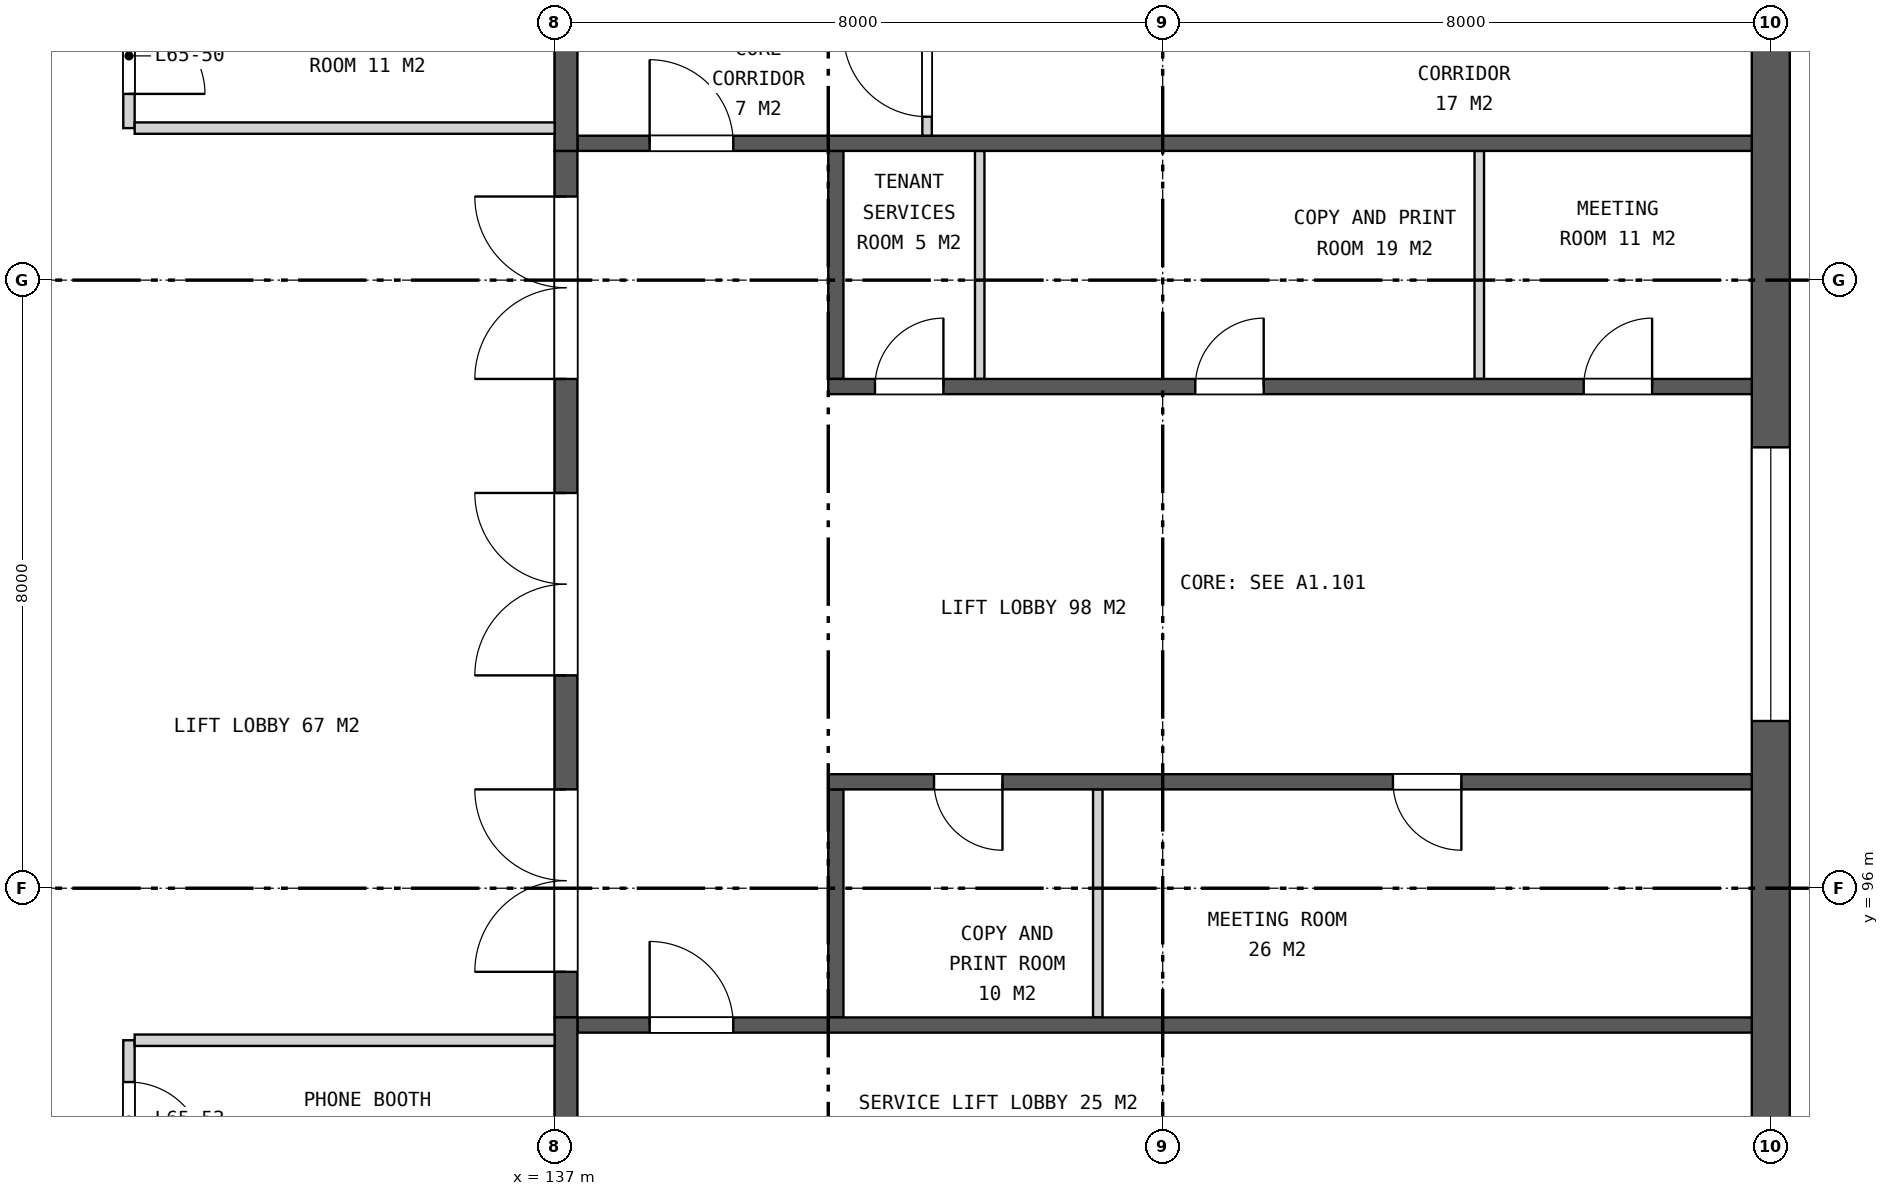
"""IFC4 building model, lengths in metres.
Left out: names, types, materials, properties, quantities, classifications, styles, units other than length and angle.
Written with IfcOpenShell. Run it as: python <this file> out.ifc"""

import sys

from ifc_helpers import new_model, si_unit, direction, frame, frame_2d, origin, place, context, subcontext, project, spatial, rectangle, extrude, element, fill, save


model = new_model("IFC4")
c1 = context("Model", 3, precision=1e-05, world=origin(), true_north=direction((0.0, 1.0)))
c2 = subcontext(c1, "Body", "Model", "MODEL_VIEW")
j1 = project(units=[si_unit("LENGTHUNIT", "METRE"), si_unit("PLANEANGLEUNIT", "RADIAN")], contexts=[c1])
p1 = place(None, origin())
s1 = spatial("IfcSite", under=j1, at=p1, CompositionType="ELEMENT")
p2 = place(p1, origin())
s2 = spatial("IfcBuilding", under=s1, at=p2, CompositionType="ELEMENT")
p3 = place(p2, frame((0.0, 0.0, 299.7)))
s3 = spatial("IfcBuildingStorey", under=s2, at=p3, CompositionType="ELEMENT", Elevation=299.7)
p4 = place(p3, frame((153.0, 88.25, 0.0), z_axis=(0.0, 0.0, 1.0), x_axis=(0.0, 1.0, 0.0)))
e1 = element("IfcWall", 1, at=p4, inside=s3, PredefinedType="SHEAR", context=c2, shape_type="SweptSolid", body=[
    extrude(rectangle(XDim=23.5, YDim=0.5, at=frame_2d((11.75, 0.0))), origin(), (0.0, 0.0, 1.0), 4.2),
])
p5 = place(p4, frame((9.95, 0.0, 0.15)))
e2 = element("IfcOpeningElement", 2, at=p5, cuts=e1, PredefinedType="OPENING", context=c2, shape_type="SweptSolid", body=[
    extrude(rectangle(XDim=3.6, YDim=3.0, at=frame_2d((1.8, 1.5))), frame((0.0, 0.26, 0.0), z_axis=(0.0, -1.0, 0.0), x_axis=(1.0, 0.0, 0.0)), (0.0, 0.0, 1.0), 0.52),
])
p6 = place(p3, frame((137.15, 94.3, 0.0), z_axis=(0.0, 0.0, 1.0), x_axis=(0.0, 1.0, 0.0)))
e3 = element("IfcWall", 3, at=p6, inside=s3, PredefinedType="SHEAR", context=c2, shape_type="SweptSolid", body=[
    extrude(rectangle(XDim=11.4, YDim=0.3, at=frame_2d((5.7, 0.0))), origin(), (0.0, 0.0, 1.0), 4.2),
])
p7 = place(p6, frame((0.6, 0.0, 0.0)))
e4 = element("IfcOpeningElement", 4, at=p7, cuts=e3, PredefinedType="OPENING", context=c2, shape_type="SweptSolid", body=[
    extrude(rectangle(XDim=2.4, YDim=2.4, at=frame_2d((1.2, 1.2))), frame((0.0, 0.16, 0.0), z_axis=(0.0, -1.0, 0.0), x_axis=(1.0, 0.0, 0.0)), (0.0, 0.0, 1.0), 0.32),
])
p8 = place(p6, frame((4.5, 0.0, 0.0)))
e5 = element("IfcOpeningElement", 5, at=p8, cuts=e3, PredefinedType="OPENING", context=c2, shape_type="SweptSolid", body=[
    extrude(rectangle(XDim=2.4, YDim=2.4, at=frame_2d((1.2, 1.2))), frame((0.0, 0.16, 0.0), z_axis=(0.0, -1.0, 0.0), x_axis=(1.0, 0.0, 0.0)), (0.0, 0.0, 1.0), 0.32),
])
p9 = place(p6, frame((8.4, 0.0, 0.0)))
e6 = element("IfcOpeningElement", 6, at=p9, cuts=e3, PredefinedType="OPENING", context=c2, shape_type="SweptSolid", body=[
    extrude(rectangle(XDim=2.4, YDim=2.4, at=frame_2d((1.2, 1.2))), frame((0.0, 0.16, 0.0), z_axis=(0.0, -1.0, 0.0), x_axis=(1.0, 0.0, 0.0)), (0.0, 0.0, 1.0), 0.32),
])
p10 = place(p3, frame((140.7, 102.7, 0.0), z_axis=(0.0, 0.0, 1.0), x_axis=(0.0, 1.0, 0.0)))
e7 = element("IfcWall", 7, at=p10, inside=s3, PredefinedType="SHEAR", context=c2, shape_type="SweptSolid", body=[
    extrude(rectangle(XDim=3.0, YDim=0.2, at=frame_2d((1.5, 0.0))), origin(), (0.0, 0.0, 1.0), 4.2),
])
for number, where, z_axis, x_axis in (
    (8, (142.593, 102.7, 0.0), (0.0, 0.0, 1.0), (0.0, 1.0, 0.0)),
    (9, (149.165, 102.7, 0.0), (0.0, 0.0, 1.0), (0.0, 1.0, 0.0)),
):
    element("IfcWall", number, at=place(p3, frame(where, z_axis=z_axis, x_axis=x_axis)), inside=s3, PredefinedType="PARTITIONING", context=c2, shape_type="SweptSolid", body=[
        extrude(rectangle(XDim=3.0, YDim=0.125, at=frame_2d((1.5, 0.0))), origin(), (0.0, 0.0, 1.0), 4.2),
    ])
p11 = place(p3, frame((140.6, 102.6, 0.0), z_axis=(0.0, 0.0, 1.0), x_axis=(1.0, 0.0, 0.0)))
e10 = element("IfcWall", 10, at=p11, inside=s3, PredefinedType="SHEAR", context=c2, shape_type="SweptSolid", body=[
    extrude(rectangle(XDim=12.15, YDim=0.2, at=frame_2d((6.075, 0.0))), origin(), (0.0, 0.0, 1.0), 4.2),
])
p12 = place(p11, frame((0.615, 0.0, 0.0)))
e11 = element("IfcOpeningElement", 11, at=p12, cuts=e10, PredefinedType="OPENING", context=c2, shape_type="SweptSolid", body=[
    extrude(rectangle(XDim=0.9, YDim=2.1, at=frame_2d((0.45, 1.05))), frame((0.0, 0.11, 0.0), z_axis=(0.0, -1.0, 0.0), x_axis=(1.0, 0.0, 0.0)), (0.0, 0.0, 1.0), 0.22),
])
p13 = place(p11, frame((4.829, 0.0, 0.0)))
e12 = element("IfcOpeningElement", 12, at=p13, cuts=e10, PredefinedType="OPENING", context=c2, shape_type="SweptSolid", body=[
    extrude(rectangle(XDim=0.9, YDim=2.1, at=frame_2d((0.45, 1.05))), frame((0.0, 0.11, 0.0), z_axis=(0.0, -1.0, 0.0), x_axis=(1.0, 0.0, 0.0)), (0.0, 0.0, 1.0), 0.22),
])
p14 = place(p11, frame((9.939, 0.0, 0.0)))
e13 = element("IfcOpeningElement", 13, at=p14, cuts=e10, PredefinedType="OPENING", context=c2, shape_type="SweptSolid", body=[
    extrude(rectangle(XDim=0.9, YDim=2.1, at=frame_2d((0.45, 1.05))), frame((0.0, 0.11, 0.0), z_axis=(0.0, -1.0, 0.0), x_axis=(1.0, 0.0, 0.0)), (0.0, 0.0, 1.0), 0.22),
])
p15 = place(p3, frame((140.7, 94.3, 0.0), z_axis=(0.0, 0.0, 1.0), x_axis=(0.0, 1.0, 0.0)))
e14 = element("IfcWall", 14, at=p15, inside=s3, PredefinedType="SHEAR", context=c2, shape_type="SweptSolid", body=[
    extrude(rectangle(XDim=3.0, YDim=0.2, at=frame_2d((1.5, 0.0))), origin(), (0.0, 0.0, 1.0), 4.2),
])
p16 = place(p3, frame((144.146, 94.3, 0.0), z_axis=(0.0, 0.0, 1.0), x_axis=(0.0, 1.0, 0.0)))
e15 = element("IfcWall", 15, at=p16, inside=s3, PredefinedType="PARTITIONING", context=c2, shape_type="SweptSolid", body=[
    extrude(rectangle(XDim=3.0, YDim=0.125, at=frame_2d((1.5, 0.0))), origin(), (0.0, 0.0, 1.0), 4.2),
])
p17 = place(p3, frame((140.6, 97.4, 0.0), z_axis=(0.0, 0.0, 1.0), x_axis=(1.0, 0.0, 0.0)))
e16 = element("IfcWall", 16, at=p17, inside=s3, PredefinedType="SHEAR", context=c2, shape_type="SweptSolid", body=[
    extrude(rectangle(XDim=12.15, YDim=0.2, at=frame_2d((6.075, 0.0))), origin(), (0.0, 0.0, 1.0), 4.2),
])
p18 = place(p17, frame((1.392, 0.0, 0.0)))
e17 = element("IfcOpeningElement", 17, at=p18, cuts=e16, PredefinedType="OPENING", context=c2, shape_type="SweptSolid", body=[
    extrude(rectangle(XDim=0.9, YDim=2.1, at=frame_2d((0.45, 1.05))), frame((0.0, 0.11, 0.0), z_axis=(0.0, -1.0, 0.0), x_axis=(1.0, 0.0, 0.0)), (0.0, 0.0, 1.0), 0.22),
])
p19 = place(p17, frame((7.429, 0.0, 0.0)))
e18 = element("IfcOpeningElement", 18, at=p19, cuts=e16, PredefinedType="OPENING", context=c2, shape_type="SweptSolid", body=[
    extrude(rectangle(XDim=0.9, YDim=2.1, at=frame_2d((0.45, 1.05))), frame((0.0, 0.11, 0.0), z_axis=(0.0, -1.0, 0.0), x_axis=(1.0, 0.0, 0.0)), (0.0, 0.0, 1.0), 0.22),
])
p20 = place(p3, frame((137.3, 105.8, 0.0), z_axis=(0.0, 0.0, 1.0), x_axis=(1.0, 0.0, 0.0)))
e19 = element("IfcWall", 19, at=p20, inside=s3, PredefinedType="SHEAR", context=c2, shape_type="SweptSolid", body=[
    extrude(rectangle(XDim=15.45, YDim=0.2, at=frame_2d((7.725, 0.0))), origin(), (0.0, 0.0, 1.0), 4.2),
])
p21 = place(p20, frame((0.95, 0.0, 0.0)))
e20 = element("IfcOpeningElement", 20, at=p21, cuts=e19, PredefinedType="OPENING", context=c2, shape_type="SweptSolid", body=[
    extrude(rectangle(XDim=1.1, YDim=2.1, at=frame_2d((0.55, 1.05))), frame((0.0, 0.11, 0.0), z_axis=(0.0, -1.0, 0.0), x_axis=(1.0, 0.0, 0.0)), (0.0, 0.0, 1.0), 0.22),
])
p22 = place(p3, frame((137.15, 105.7, 0.0), z_axis=(0.0, 0.0, 1.0), x_axis=(0.0, 1.0, 0.0)))
e21 = element("IfcWall", 21, at=p22, inside=s3, PredefinedType="SHEAR", context=c2, shape_type="SweptSolid", body=[
    extrude(rectangle(XDim=6.05, YDim=0.3, at=frame_2d((3.025, 0.0))), origin(), (0.0, 0.0, 1.0), 4.2),
])
p23 = place(p3, frame((141.9, 105.9, 0.0), z_axis=(0.0, 0.0, 1.0), x_axis=(0.0, 1.0, 0.0)))
e22 = element("IfcWall", 22, at=p23, inside=s3, PredefinedType="PARTITIONING", context=c2, shape_type="SweptSolid", body=[
    extrude(rectangle(XDim=1.6, YDim=0.125, at=frame_2d((0.8, 0.0))), origin(), (0.0, 0.0, 1.0), 4.2),
])
p24 = place(p23, frame((0.25, 0.0, 0.0)))
e23 = element("IfcOpeningElement", 23, at=p24, cuts=e22, PredefinedType="OPENING", context=c2, shape_type="SweptSolid", body=[
    extrude(rectangle(XDim=1.1, YDim=2.1, at=frame_2d((0.55, 1.05))), frame((0.0, 0.073, 0.0), z_axis=(0.0, -1.0, 0.0), x_axis=(1.0, 0.0, 0.0)), (0.0, 0.0, 1.0), 0.145),
])
p25 = place(p3, frame((137.3, 94.2, 0.0), z_axis=(0.0, 0.0, 1.0), x_axis=(1.0, 0.0, 0.0)))
e24 = element("IfcWall", 24, at=p25, inside=s3, PredefinedType="SHEAR", context=c2, shape_type="SweptSolid", body=[
    extrude(rectangle(XDim=15.45, YDim=0.2, at=frame_2d((7.725, 0.0))), origin(), (0.0, 0.0, 1.0), 4.2),
])
p26 = place(p25, frame((0.95, 0.0, 0.0)))
e25 = element("IfcOpeningElement", 25, at=p26, cuts=e24, PredefinedType="OPENING", context=c2, shape_type="SweptSolid", body=[
    extrude(rectangle(XDim=1.1, YDim=2.1, at=frame_2d((0.55, 1.05))), frame((0.0, 0.11, 0.0), z_axis=(0.0, -1.0, 0.0), x_axis=(1.0, 0.0, 0.0)), (0.0, 0.0, 1.0), 0.22),
])
p27 = place(p3, frame((137.15, 88.25, 0.0), z_axis=(0.0, 0.0, 1.0), x_axis=(0.0, 1.0, 0.0)))
e26 = element("IfcWall", 26, at=p27, inside=s3, PredefinedType="SHEAR", context=c2, shape_type="SweptSolid", body=[
    extrude(rectangle(XDim=6.05, YDim=0.3, at=frame_2d((3.025, 0.0))), origin(), (0.0, 0.0, 1.0), 4.2),
])
p28 = place(p3, frame((131.4, 80.0, 0.0), z_axis=(0.0, 0.0, 1.0), x_axis=(0.0, 1.0, 0.0)))
e27 = element("IfcWall", 27, at=p28, inside=s3, PredefinedType="PARTITIONING", context=c2, shape_type="SweptSolid", body=[
    extrude(rectangle(XDim=14.0, YDim=0.15, at=frame_2d((7.0, 0.0))), origin(), (0.0, 0.0, 1.0), 3.255),
])
p29 = place(p28, frame((12.45, 0.0, 0.0)))
e28 = element("IfcOpeningElement", 28, at=p29, cuts=e27, PredefinedType="OPENING", context=c2, shape_type="SweptSolid", body=[
    extrude(rectangle(XDim=1.0, YDim=2.1, at=frame_2d((0.5, 1.05))), frame((0.0, 0.085, 0.0), z_axis=(0.0, -1.0, 0.0), x_axis=(1.0, 0.0, 0.0)), (0.0, 0.0, 1.0), 0.17),
])
p30 = place(p28, frame((9.45, 0.0, 0.0)))
e29 = element("IfcOpeningElement", 29, at=p30, cuts=e27, PredefinedType="OPENING", context=c2, shape_type="SweptSolid", body=[
    extrude(rectangle(XDim=1.0, YDim=2.1, at=frame_2d((0.5, 1.05))), frame((0.0, 0.085, 0.0), z_axis=(0.0, -1.0, 0.0), x_axis=(1.0, 0.0, 0.0)), (0.0, 0.0, 1.0), 0.17),
])
p31 = place(p28, frame((3.45, 0.0, 0.0)))
e30 = element("IfcOpeningElement", 30, at=p31, cuts=e27, PredefinedType="OPENING", context=c2, shape_type="SweptSolid", body=[
    extrude(rectangle(XDim=1.0, YDim=2.1, at=frame_2d((0.5, 1.05))), frame((0.0, 0.085, 0.0), z_axis=(0.0, -1.0, 0.0), x_axis=(1.0, 0.0, 0.0)), (0.0, 0.0, 1.0), 0.17),
])
p32 = place(p3, frame((131.4, 106.0, 0.0), z_axis=(0.0, 0.0, 1.0), x_axis=(0.0, 1.0, 0.0)))
e31 = element("IfcWall", 31, at=p32, inside=s3, PredefinedType="PARTITIONING", context=c2, shape_type="SweptSolid", body=[
    extrude(rectangle(XDim=13.925, YDim=0.15, at=frame_2d((6.962, 0.0))), origin(), (0.0, 0.0, 1.0), 3.255),
])
p33 = place(p32, frame((0.45, 0.0, 0.0)))
e32 = element("IfcOpeningElement", 32, at=p33, cuts=e31, PredefinedType="OPENING", context=c2, shape_type="SweptSolid", body=[
    extrude(rectangle(XDim=1.0, YDim=2.1, at=frame_2d((0.5, 1.05))), frame((0.0, 0.085, 0.0), z_axis=(0.0, -1.0, 0.0), x_axis=(1.0, 0.0, 0.0)), (0.0, 0.0, 1.0), 0.17),
])
p34 = place(p32, frame((3.45, 0.0, 0.0)))
e33 = element("IfcOpeningElement", 33, at=p34, cuts=e31, PredefinedType="OPENING", context=c2, shape_type="SweptSolid", body=[
    extrude(rectangle(XDim=1.0, YDim=2.1, at=frame_2d((0.5, 1.05))), frame((0.0, 0.085, 0.0), z_axis=(0.0, -1.0, 0.0), x_axis=(1.0, 0.0, 0.0)), (0.0, 0.0, 1.0), 0.17),
])
p35 = place(p32, frame((9.45, 0.0, 0.0)))
e34 = element("IfcOpeningElement", 34, at=p35, cuts=e31, PredefinedType="OPENING", context=c2, shape_type="SweptSolid", body=[
    extrude(rectangle(XDim=1.0, YDim=2.1, at=frame_2d((0.5, 1.05))), frame((0.0, 0.085, 0.0), z_axis=(0.0, -1.0, 0.0), x_axis=(1.0, 0.0, 0.0)), (0.0, 0.0, 1.0), 0.17),
])
for number, where, z_axis, x_axis in (
    (35, (131.475, 94.0, 0.0), (0.0, 0.0, 1.0), (1.0, 0.0, 0.0)),
    (36, (131.475, 106.0, 0.0), (0.0, 0.0, 1.0), (1.0, 0.0, 0.0)),
):
    element("IfcWall", number, at=place(p3, frame(where, z_axis=z_axis, x_axis=x_axis)), inside=s3, PredefinedType="PARTITIONING", context=c2, shape_type="SweptSolid", body=[
        extrude(rectangle(XDim=5.525, YDim=0.15, at=frame_2d((2.762, 0.0))), origin(), (0.0, 0.0, 1.0), 3.255),
    ])
p36 = place(p5, origin())
e37 = element("IfcWindow", 37, at=p36, inside=s3, PartitioningType="SINGLE_PANEL", PredefinedType="WINDOW", context=c2, shape_type="SweptSolid", body=[
    extrude(rectangle(XDim=3.6, YDim=3.0, at=frame_2d((1.8, 1.5))), frame((0.0, 0.03, 0.0), z_axis=(0.0, -1.0, 0.0), x_axis=(1.0, 0.0, 0.0)), (0.0, 0.0, 1.0), 0.06),
])
fill(e2, e37)
p37 = place(p7, origin())
e38 = element("IfcDoor", 38, at=p37, inside=s3, OperationType="DOUBLE_DOOR_SINGLE_SWING", PredefinedType="DOOR", context=c2, shape_type="SweptSolid", body=[
    extrude(rectangle(XDim=2.4, YDim=2.4, at=frame_2d((1.2, 1.2))), frame((0.0, 0.025, 0.0), z_axis=(0.0, -1.0, 0.0), x_axis=(1.0, 0.0, 0.0)), (0.0, 0.0, 1.0), 0.05),
])
fill(e4, e38)
p38 = place(p8, origin())
e39 = element("IfcDoor", 39, at=p38, inside=s3, OperationType="DOUBLE_DOOR_SINGLE_SWING", PredefinedType="DOOR", context=c2, shape_type="SweptSolid", body=[
    extrude(rectangle(XDim=2.4, YDim=2.4, at=frame_2d((1.2, 1.2))), frame((0.0, 0.025, 0.0), z_axis=(0.0, -1.0, 0.0), x_axis=(1.0, 0.0, 0.0)), (0.0, 0.0, 1.0), 0.05),
])
fill(e5, e39)
p39 = place(p9, origin())
e40 = element("IfcDoor", 40, at=p39, inside=s3, OperationType="DOUBLE_DOOR_SINGLE_SWING", PredefinedType="DOOR", context=c2, shape_type="SweptSolid", body=[
    extrude(rectangle(XDim=2.4, YDim=2.4, at=frame_2d((1.2, 1.2))), frame((0.0, 0.025, 0.0), z_axis=(0.0, -1.0, 0.0), x_axis=(1.0, 0.0, 0.0)), (0.0, 0.0, 1.0), 0.05),
])
fill(e6, e40)
p40 = place(p12, origin())
e41 = element("IfcDoor", 41, at=p40, inside=s3, OperationType="SINGLE_SWING_RIGHT", PredefinedType="DOOR", context=c2, shape_type="SweptSolid", body=[
    extrude(rectangle(XDim=0.9, YDim=2.1, at=frame_2d((0.45, 1.05))), frame((0.0, 0.025, 0.0), z_axis=(0.0, -1.0, 0.0), x_axis=(1.0, 0.0, 0.0)), (0.0, 0.0, 1.0), 0.05),
])
fill(e11, e41)
p41 = place(p13, origin())
e42 = element("IfcDoor", 42, at=p41, inside=s3, OperationType="SINGLE_SWING_RIGHT", PredefinedType="DOOR", context=c2, shape_type="SweptSolid", body=[
    extrude(rectangle(XDim=0.9, YDim=2.1, at=frame_2d((0.45, 1.05))), frame((0.0, 0.025, 0.0), z_axis=(0.0, -1.0, 0.0), x_axis=(1.0, 0.0, 0.0)), (0.0, 0.0, 1.0), 0.05),
])
fill(e12, e42)
p42 = place(p14, origin())
e43 = element("IfcDoor", 43, at=p42, inside=s3, OperationType="SINGLE_SWING_RIGHT", PredefinedType="DOOR", context=c2, shape_type="SweptSolid", body=[
    extrude(rectangle(XDim=0.9, YDim=2.1, at=frame_2d((0.45, 1.05))), frame((0.0, 0.025, 0.0), z_axis=(0.0, -1.0, 0.0), x_axis=(1.0, 0.0, 0.0)), (0.0, 0.0, 1.0), 0.05),
])
fill(e13, e43)
p43 = place(p18, frame((0.9, 0.0, 0.0), z_axis=(0.0, 0.0, 1.0), x_axis=(-1.0, 0.0, 0.0)))
e44 = element("IfcDoor", 44, at=p43, inside=s3, OperationType="SINGLE_SWING_LEFT", PredefinedType="DOOR", context=c2, shape_type="SweptSolid", body=[
    extrude(rectangle(XDim=0.9, YDim=2.1, at=frame_2d((0.45, 1.05))), frame((0.0, 0.025, 0.0), z_axis=(0.0, -1.0, 0.0), x_axis=(1.0, 0.0, 0.0)), (0.0, 0.0, 1.0), 0.05),
])
fill(e17, e44)
p44 = place(p19, frame((0.9, 0.0, 0.0), z_axis=(0.0, 0.0, 1.0), x_axis=(-1.0, 0.0, 0.0)))
e45 = element("IfcDoor", 45, at=p44, inside=s3, OperationType="SINGLE_SWING_LEFT", PredefinedType="DOOR", context=c2, shape_type="SweptSolid", body=[
    extrude(rectangle(XDim=0.9, YDim=2.1, at=frame_2d((0.45, 1.05))), frame((0.0, 0.025, 0.0), z_axis=(0.0, -1.0, 0.0), x_axis=(1.0, 0.0, 0.0)), (0.0, 0.0, 1.0), 0.05),
])
fill(e18, e45)
p45 = place(p21, origin())
e46 = element("IfcDoor", 46, at=p45, inside=s3, OperationType="SINGLE_SWING_LEFT", PredefinedType="DOOR", context=c2, shape_type="SweptSolid", body=[
    extrude(rectangle(XDim=1.1, YDim=2.1, at=frame_2d((0.55, 1.05))), frame((0.0, 0.025, 0.0), z_axis=(0.0, -1.0, 0.0), x_axis=(1.0, 0.0, 0.0)), (0.0, 0.0, 1.0), 0.05),
])
fill(e20, e46)
p46 = place(p24, origin())
e47 = element("IfcDoor", 47, at=p46, inside=s3, OperationType="SINGLE_SWING_RIGHT", PredefinedType="DOOR", context=c2, shape_type="SweptSolid", body=[
    extrude(rectangle(XDim=1.1, YDim=2.1, at=frame_2d((0.55, 1.05))), frame((0.0, 0.025, 0.0), z_axis=(0.0, -1.0, 0.0), x_axis=(1.0, 0.0, 0.0)), (0.0, 0.0, 1.0), 0.05),
])
fill(e23, e47)
p47 = place(p26, origin())
e48 = element("IfcDoor", 48, at=p47, inside=s3, OperationType="SINGLE_SWING_LEFT", PredefinedType="DOOR", context=c2, shape_type="SweptSolid", body=[
    extrude(rectangle(XDim=1.1, YDim=2.1, at=frame_2d((0.55, 1.05))), frame((0.0, 0.025, 0.0), z_axis=(0.0, -1.0, 0.0), x_axis=(1.0, 0.0, 0.0)), (0.0, 0.0, 1.0), 0.05),
])
fill(e25, e48)
p48 = place(p33, frame((1.0, 0.0, 0.0), z_axis=(0.0, 0.0, 1.0), x_axis=(-1.0, 0.0, 0.0)))
e49 = element("IfcDoor", 49, at=p48, inside=s3, OperationType="SINGLE_SWING_RIGHT", PredefinedType="DOOR", context=c2, shape_type="SweptSolid", body=[
    extrude(rectangle(XDim=1.0, YDim=2.1, at=frame_2d((0.5, 1.05))), frame((0.0, 0.025, 0.0), z_axis=(0.0, -1.0, 0.0), x_axis=(1.0, 0.0, 0.0)), (0.0, 0.0, 1.0), 0.05),
])
fill(e32, e49)
p49 = place(p29, frame((1.0, 0.0, 0.0), z_axis=(0.0, 0.0, 1.0), x_axis=(-1.0, 0.0, 0.0)))
e50 = element("IfcDoor", 50, at=p49, inside=s3, OperationType="SINGLE_SWING_RIGHT", PredefinedType="DOOR", context=c2, shape_type="SweptSolid", body=[
    extrude(rectangle(XDim=1.0, YDim=2.1, at=frame_2d((0.5, 1.05))), frame((0.0, 0.025, 0.0), z_axis=(0.0, -1.0, 0.0), x_axis=(1.0, 0.0, 0.0)), (0.0, 0.0, 1.0), 0.05),
])
fill(e28, e50)
save(model, sys.argv[1])
